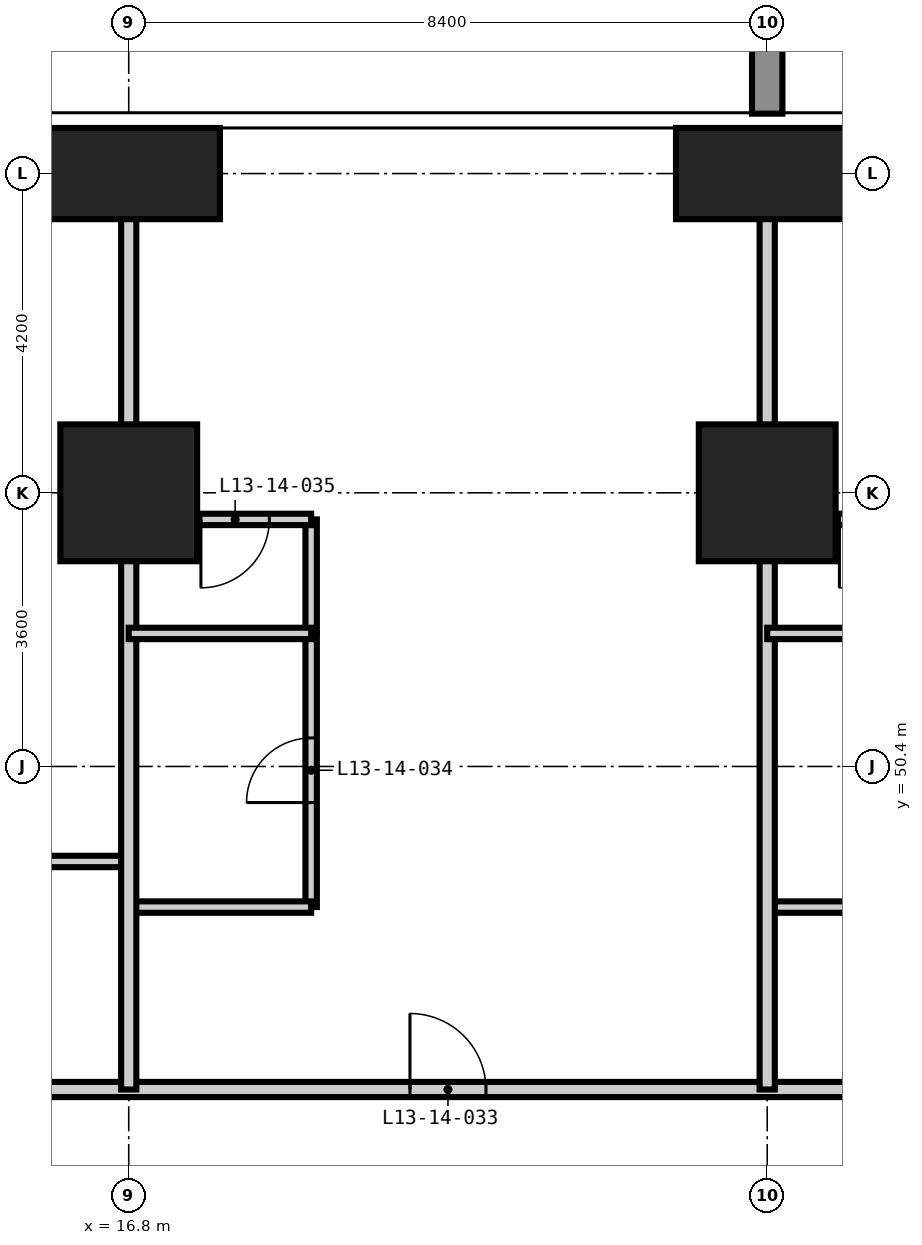
"""IFC4 building model, lengths in metres.
Left out: names, types, materials, properties, quantities, classifications, styles, units other than length and angle.
Written with IfcOpenShell. Run it as: python <this file> out.ifc"""

import sys

from ifc_helpers import new_model, si_unit, direction, frame, frame_2d, origin, origin_2d, place, context, subcontext, project, spatial, rectangle, extrude, element, fill, save


model = new_model("IFC4")
c1 = context("Model", 3, precision=1e-05, world=origin(), true_north=direction((0.0, 1.0)))
c2 = subcontext(c1, "Body", "Model", "MODEL_VIEW")
j1 = project(units=[si_unit("LENGTHUNIT", "METRE"), si_unit("PLANEANGLEUNIT", "RADIAN")], contexts=[c1])
p1 = place(None, origin())
s1 = spatial("IfcSite", under=j1, at=p1, CompositionType="ELEMENT")
p2 = place(p1, origin())
s2 = spatial("IfcBuilding", under=s1, at=p2, CompositionType="ELEMENT")
p3 = place(p2, frame((0.0, 0.0, 55.8)))
s3 = spatial("IfcBuildingStorey", under=s2, at=p3, CompositionType="ELEMENT", Elevation=55.8)
p4 = place(p3, frame((16.8, 54.0, -0.35), z_axis=(0.0, 0.0, 1.0), x_axis=(1.0, 0.0, 0.0)))
e1 = element("IfcColumn", 1, at=p4, inside=s3, PredefinedType="COLUMN", context=c2, shape_type="SweptSolid", body=[
    extrude(rectangle(XDim=1.8, YDim=1.8, at=origin_2d()), origin(), (0.0, 0.0, 1.0), 3.6),
])
p5 = place(p3, frame((16.8, 58.2, -0.35), z_axis=(0.0, 0.0, 1.0), x_axis=(1.0, 0.0, 0.0)))
e2 = element("IfcColumn", 2, at=p5, inside=s3, PredefinedType="COLUMN", context=c2, shape_type="SweptSolid", body=[
    extrude(rectangle(XDim=2.4, YDim=1.2, at=origin_2d()), origin(), (0.0, 0.0, 1.0), 3.6),
])
p6 = place(p3, frame((25.2, 54.0, -0.35), z_axis=(0.0, 0.0, 1.0), x_axis=(1.0, 0.0, 0.0)))
e3 = element("IfcColumn", 3, at=p6, inside=s3, PredefinedType="COLUMN", context=c2, shape_type="SweptSolid", body=[
    extrude(rectangle(XDim=1.8, YDim=1.8, at=origin_2d()), origin(), (0.0, 0.0, 1.0), 3.6),
])
p7 = place(p3, frame((25.2, 58.2, -0.35), z_axis=(0.0, 0.0, 1.0), x_axis=(1.0, 0.0, 0.0)))
e4 = element("IfcColumn", 4, at=p7, inside=s3, PredefinedType="COLUMN", context=c2, shape_type="SweptSolid", body=[
    extrude(rectangle(XDim=2.4, YDim=1.2, at=origin_2d()), origin(), (0.0, 0.0, 1.0), 3.6),
])
p8 = place(p3, frame((19.2, 48.55, 0.0), z_axis=(0.0, 0.0, 1.0), x_axis=(0.0, 1.0, 0.0)))
e5 = element("IfcWall", 5, at=p8, inside=s3, PredefinedType="PARTITIONING", context=c2, shape_type="SweptSolid", body=[
    extrude(rectangle(XDim=3.6, YDim=0.15, at=frame_2d((1.8, 0.0))), origin(), (0.0, 0.0, 1.0), 3.25),
])
p9 = place(p8, frame((1.375, 0.0, 0.0)))
e6 = element("IfcOpeningElement", 6, at=p9, cuts=e5, PredefinedType="OPENING", context=c2, shape_type="SweptSolid", body=[
    extrude(rectangle(XDim=0.85, YDim=2.1, at=frame_2d((0.425, 1.05))), frame((0.0, 0.085, 0.0), z_axis=(0.0, -1.0, 0.0), x_axis=(1.0, 0.0, 0.0)), (0.0, 0.0, 1.0), 0.17),
])
p10 = place(p3, frame((16.8, 48.55, 0.0), z_axis=(0.0, 0.0, 1.0), x_axis=(1.0, 0.0, 0.0)))
e7 = element("IfcWall", 7, at=p10, inside=s3, PredefinedType="PARTITIONING", context=c2, shape_type="SweptSolid", body=[
    extrude(rectangle(XDim=2.4, YDim=0.15, at=frame_2d((1.2, 0.0))), origin(), (0.0, 0.0, 1.0), 3.25),
])
p11 = place(p3, frame((25.2, 48.55, 0.0), z_axis=(0.0, 0.0, 1.0), x_axis=(1.0, 0.0, 0.0)))
e8 = element("IfcWall", 8, at=p11, inside=s3, PredefinedType="PARTITIONING", context=c2, shape_type="SweptSolid", body=[
    extrude(rectangle(XDim=2.4, YDim=0.15, at=frame_2d((1.2, 0.0))), origin(), (0.0, 0.0, 1.0), 3.25),
])
p12 = place(p3, frame((13.85, 49.15, 0.0), z_axis=(0.0, 0.0, 1.0), x_axis=(1.0, 0.0, 0.0)))
e9 = element("IfcWall", 9, at=p12, inside=s3, PredefinedType="PARTITIONING", context=c2, shape_type="SweptSolid", body=[
    extrude(rectangle(XDim=2.95, YDim=0.15, at=frame_2d((1.475, 0.0))), origin(), (0.0, 0.0, 1.0), 3.25),
])
p13 = place(p3, frame((13.85, 46.15, 0.0), z_axis=(0.0, 0.0, 1.0), x_axis=(1.0, 0.0, 0.0)))
e10 = element("IfcWall", 10, at=p13, inside=s3, PredefinedType="PARTITIONING", context=c2, shape_type="SweptSolid", body=[
    extrude(rectangle(XDim=31.7, YDim=0.2, at=frame_2d((15.85, 0.0))), origin(), (0.0, 0.0, 1.0), 3.25),
])
p14 = place(p13, frame((6.65, 0.0, 0.0)))
e11 = element("IfcOpeningElement", 11, at=p14, cuts=e10, PredefinedType="OPENING", context=c2, shape_type="SweptSolid", body=[
    extrude(rectangle(XDim=1.0, YDim=2.2, at=frame_2d((0.5, 1.1))), frame((0.0, 0.11, 0.0), z_axis=(0.0, -1.0, 0.0), x_axis=(1.0, 0.0, 0.0)), (0.0, 0.0, 1.0), 0.22),
])
p15 = place(p13, frame((15.05, 0.0, 0.0)))
e12 = element("IfcOpeningElement", 12, at=p15, cuts=e10, PredefinedType="OPENING", context=c2, shape_type="SweptSolid", body=[
    extrude(rectangle(XDim=1.0, YDim=2.2, at=frame_2d((0.5, 1.1))), frame((0.0, 0.11, 0.0), z_axis=(0.0, -1.0, 0.0), x_axis=(1.0, 0.0, 0.0)), (0.0, 0.0, 1.0), 0.22),
])
p16 = place(p13, frame((23.45, 0.0, 0.0)))
e13 = element("IfcOpeningElement", 13, at=p16, cuts=e10, PredefinedType="OPENING", context=c2, shape_type="SweptSolid", body=[
    extrude(rectangle(XDim=1.0, YDim=2.2, at=frame_2d((0.5, 1.1))), frame((0.0, 0.11, 0.0), z_axis=(0.0, -1.0, 0.0), x_axis=(1.0, 0.0, 0.0)), (0.0, 0.0, 1.0), 0.22),
])
for number, where, z_axis, x_axis in (
    (14, (16.8, 46.15, 0.0), (0.0, 0.0, 1.0), (0.0, 1.0, 0.0)),
    (15, (25.2, 46.15, 0.0), (0.0, 0.0, 1.0), (0.0, 1.0, 0.0)),
):
    element("IfcWall", number, at=place(p3, frame(where, z_axis=z_axis, x_axis=x_axis)), inside=s3, PredefinedType="PARTITIONING", context=c2, shape_type="SweptSolid", body=[
        extrude(rectangle(XDim=12.658, YDim=0.2, at=frame_2d((6.329, 0.0))), origin(), (0.0, 0.0, 1.0), 3.25),
    ])
p17 = place(p3, frame((19.2, 52.15, 0.0), z_axis=(0.0, 0.0, 1.0), x_axis=(0.0, 1.0, 0.0)))
e16 = element("IfcWall", 16, at=p17, inside=s3, PredefinedType="PARTITIONING", context=c2, shape_type="SweptSolid", body=[
    extrude(rectangle(XDim=1.5, YDim=0.15, at=frame_2d((0.75, 0.0))), origin(), (0.0, 0.0, 1.0), 3.25),
])
p18 = place(p3, frame((16.8, 52.15, 0.0), z_axis=(0.0, 0.0, 1.0), x_axis=(1.0, 0.0, 0.0)))
e17 = element("IfcWall", 17, at=p18, inside=s3, PredefinedType="PARTITIONING", context=c2, shape_type="SweptSolid", body=[
    extrude(rectangle(XDim=2.4, YDim=0.15, at=frame_2d((1.2, 0.0))), origin(), (0.0, 0.0, 1.0), 3.25),
])
p19 = place(p3, frame((25.2, 52.15, 0.0), z_axis=(0.0, 0.0, 1.0), x_axis=(1.0, 0.0, 0.0)))
e18 = element("IfcWall", 18, at=p19, inside=s3, PredefinedType="PARTITIONING", context=c2, shape_type="SweptSolid", body=[
    extrude(rectangle(XDim=2.4, YDim=0.15, at=frame_2d((1.2, 0.0))), origin(), (0.0, 0.0, 1.0), 3.25),
])
p20 = place(p3, frame((16.8, 53.65, 0.0), z_axis=(0.0, 0.0, 1.0), x_axis=(1.0, 0.0, 0.0)))
e19 = element("IfcWall", 19, at=p20, inside=s3, PredefinedType="PARTITIONING", context=c2, shape_type="SweptSolid", body=[
    extrude(rectangle(XDim=2.4, YDim=0.15, at=frame_2d((1.2, 0.0))), origin(), (0.0, 0.0, 1.0), 3.25),
])
p21 = place(p20, frame((0.95, 0.0, 0.0)))
e20 = element("IfcOpeningElement", 20, at=p21, cuts=e19, PredefinedType="OPENING", context=c2, shape_type="SweptSolid", body=[
    extrude(rectangle(XDim=0.9, YDim=2.1, at=frame_2d((0.45, 1.05))), frame((0.0, 0.085, 0.0), z_axis=(0.0, -1.0, 0.0), x_axis=(1.0, 0.0, 0.0)), (0.0, 0.0, 1.0), 0.17),
])
p22 = place(p3, frame((25.2, 53.65, 0.0), z_axis=(0.0, 0.0, 1.0), x_axis=(1.0, 0.0, 0.0)))
e21 = element("IfcWall", 21, at=p22, inside=s3, PredefinedType="PARTITIONING", context=c2, shape_type="SweptSolid", body=[
    extrude(rectangle(XDim=2.4, YDim=0.15, at=frame_2d((1.2, 0.0))), origin(), (0.0, 0.0, 1.0), 3.25),
])
p23 = place(p22, frame((0.95, 0.0, 0.0)))
e22 = element("IfcOpeningElement", 22, at=p23, cuts=e21, PredefinedType="OPENING", context=c2, shape_type="SweptSolid", body=[
    extrude(rectangle(XDim=0.9, YDim=2.1, at=frame_2d((0.45, 1.05))), frame((0.0, 0.085, 0.0), z_axis=(0.0, -1.0, 0.0), x_axis=(1.0, 0.0, 0.0)), (0.0, 0.0, 1.0), 0.17),
])
p24 = place(p14, origin())
e23 = element("IfcDoor", 23, at=p24, inside=s3, OperationType="SINGLE_SWING_LEFT", PredefinedType="DOOR", context=c2, shape_type="SweptSolid", body=[
    extrude(rectangle(XDim=1.0, YDim=2.2, at=frame_2d((0.5, 1.1))), frame((0.0, 0.025, 0.0), z_axis=(0.0, -1.0, 0.0), x_axis=(1.0, 0.0, 0.0)), (0.0, 0.0, 1.0), 0.05),
])
fill(e11, e23)
p25 = place(p9, origin())
e24 = element("IfcDoor", 24, at=p25, inside=s3, OperationType="SINGLE_SWING_LEFT", PredefinedType="DOOR", context=c2, shape_type="SweptSolid", body=[
    extrude(rectangle(XDim=0.85, YDim=2.1, at=frame_2d((0.425, 1.05))), frame((0.0, 0.025, 0.0), z_axis=(0.0, -1.0, 0.0), x_axis=(1.0, 0.0, 0.0)), (0.0, 0.0, 1.0), 0.05),
])
fill(e6, e24)
p26 = place(p21, frame((0.9, 0.0, 0.0), z_axis=(0.0, 0.0, 1.0), x_axis=(-1.0, 0.0, 0.0)))
e25 = element("IfcDoor", 25, at=p26, inside=s3, OperationType="SINGLE_SWING_RIGHT", PredefinedType="DOOR", context=c2, shape_type="SweptSolid", body=[
    extrude(rectangle(XDim=0.9, YDim=2.1, at=frame_2d((0.45, 1.05))), frame((0.0, 0.025, 0.0), z_axis=(0.0, -1.0, 0.0), x_axis=(1.0, 0.0, 0.0)), (0.0, 0.0, 1.0), 0.05),
])
fill(e20, e25)
p27 = place(p23, frame((0.9, 0.0, 0.0), z_axis=(0.0, 0.0, 1.0), x_axis=(-1.0, 0.0, 0.0)))
e26 = element("IfcDoor", 26, at=p27, inside=s3, OperationType="SINGLE_SWING_RIGHT", PredefinedType="DOOR", context=c2, shape_type="SweptSolid", body=[
    extrude(rectangle(XDim=0.9, YDim=2.1, at=frame_2d((0.45, 1.05))), frame((0.0, 0.025, 0.0), z_axis=(0.0, -1.0, 0.0), x_axis=(1.0, 0.0, 0.0)), (0.0, 0.0, 1.0), 0.05),
])
fill(e22, e26)
save(model, sys.argv[1])
